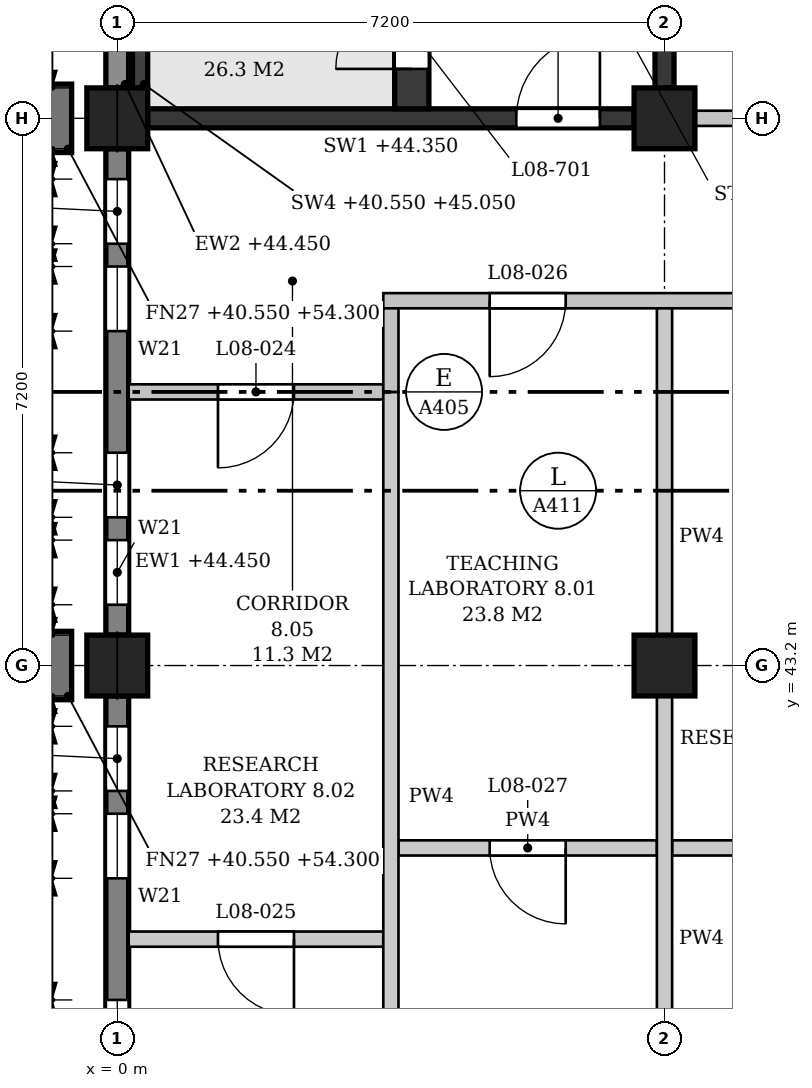
"""IFC4 building model, lengths in metres.
Left out: names, types, materials, properties, quantities, classifications, styles, units other than length and angle.
Written with IfcOpenShell. Run it as: python <this file> out.ifc"""

import sys

from ifc_helpers import new_model, si_unit, direction, frame, frame_2d, origin, origin_2d, place, context, subcontext, project, spatial, polyline, rectangle, outline, extrude, element, fill, save


model = new_model("IFC4")
c1 = context("Model", 3, precision=1e-05, world=origin(), true_north=direction((0.0, 1.0)))
c2 = subcontext(c1, "Body", "Model", "MODEL_VIEW")
j1 = project(units=[si_unit("LENGTHUNIT", "METRE"), si_unit("PLANEANGLEUNIT", "RADIAN")], contexts=[c1])
p1 = place(None, origin())
s1 = spatial("IfcSite", under=j1, at=p1, CompositionType="ELEMENT")
p2 = place(p1, origin())
s2 = spatial("IfcBuilding", under=s1, at=p2, CompositionType="ELEMENT")
p3 = place(p2, frame((0.0, 0.0, 40.8)))
s3 = spatial("IfcBuildingStorey", under=s2, at=p3, CompositionType="ELEMENT", Elevation=40.8)
for number, where, z_axis, x_axis in (
    (1, (0.0, 43.2, 0.0), (0.0, 0.0, 1.0), (1.0, 0.0, 0.0)),
    (2, (0.0, 50.4, 0.0), (0.0, 0.0, 1.0), (1.0, 0.0, 0.0)),
    (3, (7.2, 43.2, 0.0), (0.0, 0.0, 1.0), (1.0, 0.0, 0.0)),
    (4, (7.2, 50.4, 0.0), (0.0, 0.0, 1.0), (1.0, 0.0, 0.0)),
):
    element("IfcColumn", number, at=place(p3, frame(where, z_axis=z_axis, x_axis=x_axis)), inside=s3, PredefinedType="COLUMN", context=c2, shape_type="SweptSolid", body=[
        extrude(rectangle(XDim=0.8, YDim=0.8, at=origin_2d()), origin(), (0.0, 0.0, 1.0), 4.5),
    ])
p4 = place(p3, frame((0.0, 36.4, 0.0), z_axis=(0.0, 0.0, 1.0), x_axis=(0.0, 1.0, 0.0)))
e5 = element("IfcWall", 5, at=p4, inside=s3, PredefinedType="STANDARD", context=c2, shape_type="SweptSolid", body=[
    extrude(rectangle(XDim=6.4, YDim=0.3, at=frame_2d((3.2, 0.0))), origin(), (0.0, 0.0, 1.0), 3.65),
])
p5 = place(p4, frame((0.4, 0.0, 0.9)))
e6 = element("IfcOpeningElement", 6, at=p5, cuts=e5, PredefinedType="OPENING", context=c2, shape_type="SweptSolid", body=[
    extrude(outline(polyline([(0.0, 0.0), (0.85, 0.0), (0.85, 2.25), (0.425, 2.7), (0.0, 2.25), (0.0, 0.0)])), frame((0.0, 0.16, 0.0), z_axis=(0.0, -1.0, 0.0), x_axis=(1.0, 0.0, 0.0)), (0.0, 0.0, 1.0), 0.32),
])
p6 = place(p4, frame((1.55, 0.0, 0.9)))
e7 = element("IfcOpeningElement", 7, at=p6, cuts=e5, PredefinedType="OPENING", context=c2, shape_type="SweptSolid", body=[
    extrude(outline(polyline([(0.0, 0.0), (0.85, 0.0), (0.85, 2.25), (0.425, 2.7), (0.0, 2.25), (0.0, 0.0)])), frame((0.0, 0.16, 0.0), z_axis=(0.0, -1.0, 0.0), x_axis=(1.0, 0.0, 0.0)), (0.0, 0.0, 1.0), 0.32),
])
p7 = place(p4, frame((4.0, 0.0, 0.9)))
e8 = element("IfcOpeningElement", 8, at=p7, cuts=e5, PredefinedType="OPENING", context=c2, shape_type="SweptSolid", body=[
    extrude(outline(polyline([(0.0, 0.0), (0.85, 0.0), (0.85, 2.25), (0.425, 2.7), (0.0, 2.25), (0.0, 0.0)])), frame((0.0, 0.16, 0.0), z_axis=(0.0, -1.0, 0.0), x_axis=(1.0, 0.0, 0.0)), (0.0, 0.0, 1.0), 0.32),
])
p8 = place(p4, frame((5.15, 0.0, 0.9)))
e9 = element("IfcOpeningElement", 9, at=p8, cuts=e5, PredefinedType="OPENING", context=c2, shape_type="SweptSolid", body=[
    extrude(outline(polyline([(0.0, 0.0), (0.85, 0.0), (0.85, 2.25), (0.425, 2.7), (0.0, 2.25), (0.0, 0.0)])), frame((0.0, 0.16, 0.0), z_axis=(0.0, -1.0, 0.0), x_axis=(1.0, 0.0, 0.0)), (0.0, 0.0, 1.0), 0.32),
])
p9 = place(p3, frame((0.0, 43.6, 0.0), z_axis=(0.0, 0.0, 1.0), x_axis=(0.0, 1.0, 0.0)))
e10 = element("IfcWall", 10, at=p9, inside=s3, PredefinedType="STANDARD", context=c2, shape_type="SweptSolid", body=[
    extrude(rectangle(XDim=6.4, YDim=0.3, at=frame_2d((3.2, 0.0))), origin(), (0.0, 0.0, 1.0), 3.65),
])
p10 = place(p9, frame((0.4, 0.0, 0.9)))
e11 = element("IfcOpeningElement", 11, at=p10, cuts=e10, PredefinedType="OPENING", context=c2, shape_type="SweptSolid", body=[
    extrude(outline(polyline([(0.0, 0.0), (0.85, 0.0), (0.85, 2.25), (0.425, 2.7), (0.0, 2.25), (0.0, 0.0)])), frame((0.0, 0.16, 0.0), z_axis=(0.0, -1.0, 0.0), x_axis=(1.0, 0.0, 0.0)), (0.0, 0.0, 1.0), 0.32),
])
p11 = place(p9, frame((1.55, 0.0, 0.9)))
e12 = element("IfcOpeningElement", 12, at=p11, cuts=e10, PredefinedType="OPENING", context=c2, shape_type="SweptSolid", body=[
    extrude(outline(polyline([(0.0, 0.0), (0.85, 0.0), (0.85, 2.25), (0.425, 2.7), (0.0, 2.25), (0.0, 0.0)])), frame((0.0, 0.16, 0.0), z_axis=(0.0, -1.0, 0.0), x_axis=(1.0, 0.0, 0.0)), (0.0, 0.0, 1.0), 0.32),
])
p12 = place(p9, frame((4.0, 0.0, 0.9)))
e13 = element("IfcOpeningElement", 13, at=p12, cuts=e10, PredefinedType="OPENING", context=c2, shape_type="SweptSolid", body=[
    extrude(outline(polyline([(0.0, 0.0), (0.85, 0.0), (0.85, 2.25), (0.425, 2.7), (0.0, 2.25), (0.0, 0.0)])), frame((0.0, 0.16, 0.0), z_axis=(0.0, -1.0, 0.0), x_axis=(1.0, 0.0, 0.0)), (0.0, 0.0, 1.0), 0.32),
])
p13 = place(p9, frame((5.15, 0.0, 0.9)))
e14 = element("IfcOpeningElement", 14, at=p13, cuts=e10, PredefinedType="OPENING", context=c2, shape_type="SweptSolid", body=[
    extrude(outline(polyline([(0.0, 0.0), (0.85, 0.0), (0.85, 2.25), (0.425, 2.7), (0.0, 2.25), (0.0, 0.0)])), frame((0.0, 0.16, 0.0), z_axis=(0.0, -1.0, 0.0), x_axis=(1.0, 0.0, 0.0)), (0.0, 0.0, 1.0), 0.32),
])
p14 = place(p3, frame((0.0, 50.8, 0.0), z_axis=(0.0, 0.0, 1.0), x_axis=(0.0, 1.0, 0.0)))
e15 = element("IfcWall", 15, at=p14, inside=s3, PredefinedType="STANDARD", context=c2, shape_type="SweptSolid", body=[
    extrude(rectangle(XDim=6.4, YDim=0.3, at=frame_2d((3.2, 0.0))), origin(), (0.0, 0.0, 1.0), 3.65),
])
p15 = place(p14, frame((0.95, 0.0, 0.9)))
e16 = element("IfcOpeningElement", 16, at=p15, cuts=e15, PredefinedType="OPENING", context=c2, shape_type="SweptSolid", body=[
    extrude(outline(polyline([(0.0, 0.0), (0.9, 0.0), (0.9, 2.25), (0.45, 2.7), (0.0, 2.25), (0.0, 0.0)])), frame((0.0, 0.16, 0.0), z_axis=(0.0, -1.0, 0.0), x_axis=(1.0, 0.0, 0.0)), (0.0, 0.0, 1.0), 0.32),
])
p16 = place(p14, frame((4.55, 0.0, 0.9)))
e17 = element("IfcOpeningElement", 17, at=p16, cuts=e15, PredefinedType="OPENING", context=c2, shape_type="SweptSolid", body=[
    extrude(outline(polyline([(0.0, 0.0), (0.9, 0.0), (0.9, 2.25), (0.45, 2.7), (0.0, 2.25), (0.0, 0.0)])), frame((0.0, 0.16, 0.0), z_axis=(0.0, -1.0, 0.0), x_axis=(1.0, 0.0, 0.0)), (0.0, 0.0, 1.0), 0.32),
])
for number, where, z_axis, x_axis in (
    (18, (-0.6, 43.2, -0.25), (0.0, 0.0, 1.0), (-1.0, 0.0, 0.0)),
    (19, (-0.6, 50.4, -0.25), (0.0, 0.0, 1.0), (-1.0, 0.0, 0.0)),
):
    element("IfcWall", number, at=place(p3, frame(where, z_axis=z_axis, x_axis=x_axis)), inside=s3, PredefinedType="POLYGONAL", context=c2, shape_type="SweptSolid", body=[
        extrude(outline(polyline([(1.1, 0.0), (1.1, 12.325), (0.15, 13.75), (0.0, 13.75), (0.0, 0.0), (1.1, 0.0)])), frame((0.0, 0.45, 0.0), z_axis=(0.0, -1.0, 0.0), x_axis=(1.0, 0.0, 0.0)), (0.0, 0.0, 1.0), 0.9),
    ])
p17 = place(p3, frame((0.4, 50.4, 0.0), z_axis=(0.0, 0.0, 1.0), x_axis=(1.0, 0.0, 0.0)))
e20 = element("IfcWall", 20, at=p17, inside=s3, PredefinedType="SHEAR", context=c2, shape_type="SweptSolid", body=[
    extrude(rectangle(XDim=6.4, YDim=0.25, at=frame_2d((3.2, 0.0))), origin(), (0.0, 0.0, 1.0), 3.55),
])
p18 = place(p17, frame((4.85, 0.0, 0.0)))
e21 = element("IfcOpeningElement", 21, at=p18, cuts=e20, PredefinedType="OPENING", context=c2, shape_type="SweptSolid", body=[
    extrude(rectangle(XDim=1.1, YDim=2.1, at=frame_2d((0.55, 1.05))), frame((0.0, 0.135, 0.0), z_axis=(0.0, -1.0, 0.0), x_axis=(1.0, 0.0, 0.0)), (0.0, 0.0, 1.0), 0.27),
])
p19 = place(p3, frame((7.2, 50.8, 0.0), z_axis=(0.0, 0.0, 1.0), x_axis=(0.0, 1.0, 0.0)))
e22 = element("IfcWall", 22, at=p19, inside=s3, PredefinedType="SHEAR", context=c2, shape_type="SweptSolid", body=[
    extrude(rectangle(XDim=6.4, YDim=0.25, at=frame_2d((3.2, 0.0))), origin(), (0.0, 0.0, 1.0), 3.55),
])
p20 = place(p3, frame((0.3, 50.8, -0.25), z_axis=(0.0, 0.0, 1.0), x_axis=(0.0, 1.0, 0.0)))
e23 = element("IfcWall", 23, at=p20, inside=s3, PredefinedType="SHEAR", context=c2, shape_type="SweptSolid", body=[
    extrude(rectangle(XDim=0.95, YDim=0.2, at=frame_2d((0.475, 0.0))), origin(), (0.0, 0.0, 1.0), 4.5),
])
p21 = place(p3, frame((3.875, 50.525, 0.0), z_axis=(0.0, 0.0, 1.0), x_axis=(0.0, 1.0, 0.0)))
e24 = element("IfcWall", 24, at=p21, inside=s3, PredefinedType="SHEAR", context=c2, shape_type="SweptSolid", body=[
    extrude(rectangle(XDim=6.925, YDim=0.45, at=frame_2d((3.462, 0.0))), origin(), (0.0, 0.0, 1.0), 4.25),
])
p22 = place(p21, frame((0.525, 0.0, 0.0)))
e25 = element("IfcOpeningElement", 25, at=p22, cuts=e24, PredefinedType="OPENING", context=c2, shape_type="SweptSolid", body=[
    extrude(rectangle(XDim=1.0, YDim=2.1, at=frame_2d((0.5, 1.05))), frame((0.0, 0.235, 0.0), z_axis=(0.0, -1.0, 0.0), x_axis=(1.0, 0.0, 0.0)), (0.0, 0.0, 1.0), 0.47),
])
p23 = place(p3, frame((0.15, 39.6, 0.0), z_axis=(0.0, 0.0, 1.0), x_axis=(1.0, 0.0, 0.0)))
e26 = element("IfcWall", 26, at=p23, inside=s3, PredefinedType="PARTITIONING", context=c2, shape_type="SweptSolid", body=[
    extrude(outline(polyline([(0.0, 0.0), (3.35, 0.0), (3.35, 4.25), (0.05, 4.25), (0.05, 3.65), (0.0, 3.65), (0.0, 0.0)])), frame((0.0, 0.1, 0.0), z_axis=(0.0, -1.0, 0.0), x_axis=(1.0, 0.0, 0.0)), (0.0, 0.0, 1.0), 0.2),
])
p24 = place(p23, frame((1.175, 0.0, 0.0)))
e27 = element("IfcOpeningElement", 27, at=p24, cuts=e26, PredefinedType="OPENING", context=c2, shape_type="SweptSolid", body=[
    extrude(rectangle(XDim=1.0, YDim=2.1, at=frame_2d((0.5, 1.05))), frame((0.0, 0.11, 0.0), z_axis=(0.0, -1.0, 0.0), x_axis=(1.0, 0.0, 0.0)), (0.0, 0.0, 1.0), 0.22),
])
p25 = place(p3, frame((3.7, 40.8, 0.0), z_axis=(0.0, 0.0, 1.0), x_axis=(1.0, 0.0, 0.0)))
e28 = element("IfcWall", 28, at=p25, inside=s3, PredefinedType="PARTITIONING", context=c2, shape_type="SweptSolid", body=[
    extrude(outline(polyline([(0.0, 0.0), (3.4, 0.0), (3.4, 3.55), (3.275, 3.55), (3.275, 4.25), (0.0, 4.25), (0.0, 0.0)])), frame((0.0, 0.1, 0.0), z_axis=(0.0, -1.0, 0.0), x_axis=(1.0, 0.0, 0.0)), (0.0, 0.0, 1.0), 0.2),
])
p26 = place(p25, frame((1.2, 0.0, 0.0)))
e29 = element("IfcOpeningElement", 29, at=p26, cuts=e28, PredefinedType="OPENING", context=c2, shape_type="SweptSolid", body=[
    extrude(rectangle(XDim=1.0, YDim=2.1, at=frame_2d((0.5, 1.05))), frame((0.0, 0.11, 0.0), z_axis=(0.0, -1.0, 0.0), x_axis=(1.0, 0.0, 0.0)), (0.0, 0.0, 1.0), 0.22),
])
p27 = place(p3, frame((7.3, 40.8, 0.0), z_axis=(0.0, 0.0, 1.0), x_axis=(1.0, 0.0, 0.0)))
e30 = element("IfcWall", 30, at=p27, inside=s3, PredefinedType="PARTITIONING", context=c2, shape_type="SweptSolid", body=[
    extrude(outline(polyline([(0.0, 0.0), (7.0, 0.0), (7.0, 3.55), (6.875, 3.55), (6.875, 4.25), (0.125, 4.25), (0.125, 3.55), (0.0, 3.55), (0.0, 0.0)])), frame((0.0, 0.1, 0.0), z_axis=(0.0, -1.0, 0.0), x_axis=(1.0, 0.0, 0.0)), (0.0, 0.0, 1.0), 0.2),
])
p28 = place(p27, frame((1.25, 0.0, 0.0)))
e31 = element("IfcOpeningElement", 31, at=p28, cuts=e30, PredefinedType="OPENING", context=c2, shape_type="SweptSolid", body=[
    extrude(rectangle(XDim=1.0, YDim=2.1, at=frame_2d((0.5, 1.05))), frame((0.0, 0.11, 0.0), z_axis=(0.0, -1.0, 0.0), x_axis=(1.0, 0.0, 0.0)), (0.0, 0.0, 1.0), 0.22),
])
p29 = place(p27, frame((4.75, 0.0, 0.0)))
e32 = element("IfcOpeningElement", 32, at=p29, cuts=e30, PredefinedType="OPENING", context=c2, shape_type="SweptSolid", body=[
    extrude(rectangle(XDim=1.0, YDim=2.1, at=frame_2d((0.5, 1.05))), frame((0.0, 0.11, 0.0), z_axis=(0.0, -1.0, 0.0), x_axis=(1.0, 0.0, 0.0)), (0.0, 0.0, 1.0), 0.22),
])
p30 = place(p3, frame((0.15, 46.8, 0.0), z_axis=(0.0, 0.0, 1.0), x_axis=(1.0, 0.0, 0.0)))
e33 = element("IfcWall", 33, at=p30, inside=s3, PredefinedType="PARTITIONING", context=c2, shape_type="SweptSolid", body=[
    extrude(outline(polyline([(0.0, 0.0), (3.35, 0.0), (3.35, 4.25), (0.05, 4.25), (0.05, 3.65), (0.0, 3.65), (0.0, 0.0)])), frame((0.0, 0.1, 0.0), z_axis=(0.0, -1.0, 0.0), x_axis=(1.0, 0.0, 0.0)), (0.0, 0.0, 1.0), 0.2),
])
p31 = place(p30, frame((1.175, 0.0, 0.0)))
e34 = element("IfcOpeningElement", 34, at=p31, cuts=e33, PredefinedType="OPENING", context=c2, shape_type="SweptSolid", body=[
    extrude(rectangle(XDim=1.0, YDim=2.1, at=frame_2d((0.5, 1.05))), frame((0.0, 0.11, 0.0), z_axis=(0.0, -1.0, 0.0), x_axis=(1.0, 0.0, 0.0)), (0.0, 0.0, 1.0), 0.22),
])
p32 = place(p3, frame((3.5, 48.0, 0.0), z_axis=(0.0, 0.0, 1.0), x_axis=(1.0, 0.0, 0.0)))
e35 = element("IfcWall", 35, at=p32, inside=s3, PredefinedType="PARTITIONING", context=c2, shape_type="SweptSolid", body=[
    extrude(outline(polyline([(0.0, 0.0), (14.6, 0.0), (14.6, 4.25), (11.125, 4.25), (11.125, 3.55), (10.675, 3.55), (10.675, 4.25), (3.925, 4.25), (3.925, 3.55), (3.475, 3.55), (3.475, 4.25), (0.0, 4.25), (0.0, 0.0)])), frame((0.0, 0.1, 0.0), z_axis=(0.0, -1.0, 0.0), x_axis=(1.0, 0.0, 0.0)), (0.0, 0.0, 1.0), 0.2),
])
p33 = place(p32, frame((1.4, 0.0, 0.0)))
e36 = element("IfcOpeningElement", 36, at=p33, cuts=e35, PredefinedType="OPENING", context=c2, shape_type="SweptSolid", body=[
    extrude(rectangle(XDim=1.0, YDim=2.1, at=frame_2d((0.5, 1.05))), frame((0.0, 0.11, 0.0), z_axis=(0.0, -1.0, 0.0), x_axis=(1.0, 0.0, 0.0)), (0.0, 0.0, 1.0), 0.22),
])
p34 = place(p32, frame((6.8, 0.0, 0.0)))
e37 = element("IfcOpeningElement", 37, at=p34, cuts=e35, PredefinedType="OPENING", context=c2, shape_type="SweptSolid", body=[
    extrude(rectangle(XDim=1.0, YDim=2.1, at=frame_2d((0.5, 1.05))), frame((0.0, 0.11, 0.0), z_axis=(0.0, -1.0, 0.0), x_axis=(1.0, 0.0, 0.0)), (0.0, 0.0, 1.0), 0.22),
])
p35 = place(p3, frame((7.6, 50.4, 0.0), z_axis=(0.0, 0.0, 1.0), x_axis=(1.0, 0.0, 0.0)))
e38 = element("IfcWall", 38, at=p35, inside=s3, PredefinedType="PARTITIONING", context=c2, shape_type="SweptSolid", body=[
    extrude(rectangle(XDim=6.4, YDim=0.2, at=frame_2d((3.2, 0.0))), origin(), (0.0, 0.0, 1.0), 3.55),
])
p36 = place(p35, frame((2.7, 0.0, 0.0)))
e39 = element("IfcOpeningElement", 39, at=p36, cuts=e38, PredefinedType="OPENING", context=c2, shape_type="SweptSolid", body=[
    extrude(rectangle(XDim=1.0, YDim=2.1, at=frame_2d((0.5, 1.05))), frame((0.0, 0.11, 0.0), z_axis=(0.0, -1.0, 0.0), x_axis=(1.0, 0.0, 0.0)), (0.0, 0.0, 1.0), 0.22),
])
p37 = place(p3, frame((3.6, 36.15, 0.0), z_axis=(0.0, 0.0, 1.0), x_axis=(0.0, 1.0, 0.0)))
e40 = element("IfcWall", 40, at=p37, inside=s3, PredefinedType="PARTITIONING", context=c2, shape_type="SweptSolid", body=[
    extrude(outline(polyline([(0.0, 0.0), (10.65, 0.0), (10.65, 4.25), (7.275, 4.25), (7.275, 3.55), (6.825, 3.55), (6.825, 4.25), (0.05, 4.25), (0.05, 3.65), (0.0, 3.65), (0.0, 0.0)])), frame((0.0, 0.1, 0.0), z_axis=(0.0, -1.0, 0.0), x_axis=(1.0, 0.0, 0.0)), (0.0, 0.0, 1.0), 0.2),
])
p38 = place(p3, frame((3.6, 46.8, 0.0), z_axis=(0.0, 0.0, 1.0), x_axis=(0.0, 1.0, 0.0)))
e41 = element("IfcWall", 41, at=p38, inside=s3, PredefinedType="PARTITIONING", context=c2, shape_type="SweptSolid", body=[
    extrude(rectangle(XDim=1.1, YDim=0.2, at=frame_2d((0.55, 0.0))), origin(), (0.0, 0.0, 1.0), 4.25),
])
p39 = place(p3, frame((7.2, 36.4, 0.0), z_axis=(0.0, 0.0, 1.0), x_axis=(0.0, 1.0, 0.0)))
e42 = element("IfcWall", 42, at=p39, inside=s3, PredefinedType="PARTITIONING", context=c2, shape_type="SweptSolid", body=[
    extrude(rectangle(XDim=6.4, YDim=0.2, at=frame_2d((3.2, 0.0))), origin(), (0.0, 0.0, 1.0), 3.55),
])
p40 = place(p3, frame((7.2, 43.6, 0.0), z_axis=(0.0, 0.0, 1.0), x_axis=(0.0, 1.0, 0.0)))
e43 = element("IfcWall", 43, at=p40, inside=s3, PredefinedType="PARTITIONING", context=c2, shape_type="SweptSolid", body=[
    extrude(rectangle(XDim=4.3, YDim=0.2, at=frame_2d((2.15, 0.0))), origin(), (0.0, 0.0, 1.0), 3.55),
])
p41 = place(p6, origin())
e44 = element("IfcWindow", 44, at=p41, inside=s3, PartitioningType="SINGLE_PANEL", PredefinedType="WINDOW", context=c2, shape_type="SweptSolid", body=[
    extrude(outline(polyline([(0.0, 0.0), (0.85, 0.0), (0.85, 2.25), (0.425, 2.7), (0.0, 2.25), (0.0, 0.0)])), frame((0.0, 0.03, 0.0), z_axis=(0.0, -1.0, 0.0), x_axis=(1.0, 0.0, 0.0)), (0.0, 0.0, 1.0), 0.06),
])
fill(e7, e44)
p42 = place(p7, origin())
e45 = element("IfcWindow", 45, at=p42, inside=s3, PartitioningType="SINGLE_PANEL", PredefinedType="WINDOW", context=c2, shape_type="SweptSolid", body=[
    extrude(outline(polyline([(0.0, 0.0), (0.85, 0.0), (0.85, 2.25), (0.425, 2.7), (0.0, 2.25), (0.0, 0.0)])), frame((0.0, 0.03, 0.0), z_axis=(0.0, -1.0, 0.0), x_axis=(1.0, 0.0, 0.0)), (0.0, 0.0, 1.0), 0.06),
])
fill(e8, e45)
p43 = place(p8, origin())
e46 = element("IfcWindow", 46, at=p43, inside=s3, PartitioningType="SINGLE_PANEL", PredefinedType="WINDOW", context=c2, shape_type="SweptSolid", body=[
    extrude(outline(polyline([(0.0, 0.0), (0.85, 0.0), (0.85, 2.25), (0.425, 2.7), (0.0, 2.25), (0.0, 0.0)])), frame((0.0, 0.03, 0.0), z_axis=(0.0, -1.0, 0.0), x_axis=(1.0, 0.0, 0.0)), (0.0, 0.0, 1.0), 0.06),
])
fill(e9, e46)
p44 = place(p10, origin())
e47 = element("IfcWindow", 47, at=p44, inside=s3, PartitioningType="SINGLE_PANEL", PredefinedType="WINDOW", context=c2, shape_type="SweptSolid", body=[
    extrude(outline(polyline([(0.0, 0.0), (0.85, 0.0), (0.85, 2.25), (0.425, 2.7), (0.0, 2.25), (0.0, 0.0)])), frame((0.0, 0.03, 0.0), z_axis=(0.0, -1.0, 0.0), x_axis=(1.0, 0.0, 0.0)), (0.0, 0.0, 1.0), 0.06),
])
fill(e11, e47)
p45 = place(p11, origin())
e48 = element("IfcWindow", 48, at=p45, inside=s3, PartitioningType="SINGLE_PANEL", PredefinedType="WINDOW", context=c2, shape_type="SweptSolid", body=[
    extrude(outline(polyline([(0.0, 0.0), (0.85, 0.0), (0.85, 2.25), (0.425, 2.7), (0.0, 2.25), (0.0, 0.0)])), frame((0.0, 0.03, 0.0), z_axis=(0.0, -1.0, 0.0), x_axis=(1.0, 0.0, 0.0)), (0.0, 0.0, 1.0), 0.06),
])
fill(e12, e48)
p46 = place(p12, origin())
e49 = element("IfcWindow", 49, at=p46, inside=s3, PartitioningType="SINGLE_PANEL", PredefinedType="WINDOW", context=c2, shape_type="SweptSolid", body=[
    extrude(outline(polyline([(0.0, 0.0), (0.85, 0.0), (0.85, 2.25), (0.425, 2.7), (0.0, 2.25), (0.0, 0.0)])), frame((0.0, 0.03, 0.0), z_axis=(0.0, -1.0, 0.0), x_axis=(1.0, 0.0, 0.0)), (0.0, 0.0, 1.0), 0.06),
])
fill(e13, e49)
p47 = place(p13, origin())
e50 = element("IfcWindow", 50, at=p47, inside=s3, PartitioningType="SINGLE_PANEL", PredefinedType="WINDOW", context=c2, shape_type="SweptSolid", body=[
    extrude(outline(polyline([(0.0, 0.0), (0.85, 0.0), (0.85, 2.25), (0.425, 2.7), (0.0, 2.25), (0.0, 0.0)])), frame((0.0, 0.03, 0.0), z_axis=(0.0, -1.0, 0.0), x_axis=(1.0, 0.0, 0.0)), (0.0, 0.0, 1.0), 0.06),
])
fill(e14, e50)
p48 = place(p22, origin())
e51 = element("IfcDoor", 51, at=p48, inside=s3, OperationType="SINGLE_SWING_LEFT", PredefinedType="DOOR", context=c2, shape_type="SweptSolid", body=[
    extrude(rectangle(XDim=1.0, YDim=2.1, at=frame_2d((0.5, 1.05))), frame((0.0, 0.025, 0.0), z_axis=(0.0, -1.0, 0.0), x_axis=(1.0, 0.0, 0.0)), (0.0, 0.0, 1.0), 0.05),
])
fill(e25, e51)
p49 = place(p18, origin())
e52 = element("IfcDoor", 52, at=p49, inside=s3, OperationType="SINGLE_SWING_RIGHT", PredefinedType="DOOR", context=c2, shape_type="SweptSolid", body=[
    extrude(rectangle(XDim=1.1, YDim=2.1, at=frame_2d((0.55, 1.05))), frame((0.0, 0.025, 0.0), z_axis=(0.0, -1.0, 0.0), x_axis=(1.0, 0.0, 0.0)), (0.0, 0.0, 1.0), 0.05),
])
fill(e21, e52)
p50 = place(p31, frame((1.0, 0.0, 0.0), z_axis=(0.0, 0.0, 1.0), x_axis=(-1.0, 0.0, 0.0)))
e53 = element("IfcDoor", 53, at=p50, inside=s3, OperationType="SINGLE_SWING_RIGHT", PredefinedType="DOOR", context=c2, shape_type="SweptSolid", body=[
    extrude(rectangle(XDim=1.0, YDim=2.1, at=frame_2d((0.5, 1.05))), frame((0.0, 0.025, 0.0), z_axis=(0.0, -1.0, 0.0), x_axis=(1.0, 0.0, 0.0)), (0.0, 0.0, 1.0), 0.05),
])
fill(e34, e53)
p51 = place(p24, frame((1.0, 0.0, 0.0), z_axis=(0.0, 0.0, 1.0), x_axis=(-1.0, 0.0, 0.0)))
e54 = element("IfcDoor", 54, at=p51, inside=s3, OperationType="SINGLE_SWING_LEFT", PredefinedType="DOOR", context=c2, shape_type="SweptSolid", body=[
    extrude(rectangle(XDim=1.0, YDim=2.1, at=frame_2d((0.5, 1.05))), frame((0.0, 0.025, 0.0), z_axis=(0.0, -1.0, 0.0), x_axis=(1.0, 0.0, 0.0)), (0.0, 0.0, 1.0), 0.05),
])
fill(e27, e54)
p52 = place(p33, frame((1.0, 0.0, 0.0), z_axis=(0.0, 0.0, 1.0), x_axis=(-1.0, 0.0, 0.0)))
e55 = element("IfcDoor", 55, at=p52, inside=s3, OperationType="SINGLE_SWING_RIGHT", PredefinedType="DOOR", context=c2, shape_type="SweptSolid", body=[
    extrude(rectangle(XDim=1.0, YDim=2.1, at=frame_2d((0.5, 1.05))), frame((0.0, 0.025, 0.0), z_axis=(0.0, -1.0, 0.0), x_axis=(1.0, 0.0, 0.0)), (0.0, 0.0, 1.0), 0.05),
])
fill(e36, e55)
p53 = place(p26, frame((1.0, 0.0, 0.0), z_axis=(0.0, 0.0, 1.0), x_axis=(-1.0, 0.0, 0.0)))
e56 = element("IfcDoor", 56, at=p53, inside=s3, OperationType="SINGLE_SWING_LEFT", PredefinedType="DOOR", context=c2, shape_type="SweptSolid", body=[
    extrude(rectangle(XDim=1.0, YDim=2.1, at=frame_2d((0.5, 1.05))), frame((0.0, 0.025, 0.0), z_axis=(0.0, -1.0, 0.0), x_axis=(1.0, 0.0, 0.0)), (0.0, 0.0, 1.0), 0.05),
])
fill(e29, e56)
save(model, sys.argv[1])
